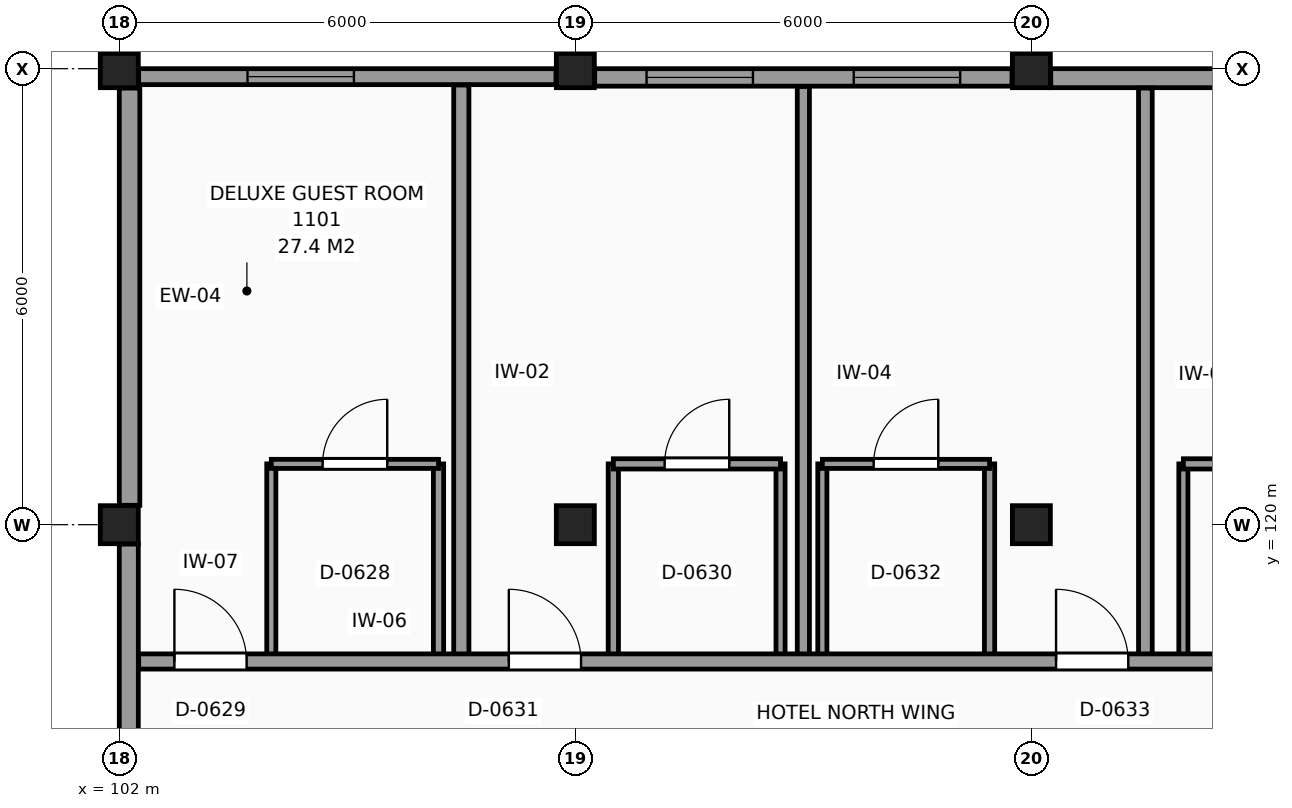
"""IFC4 building model, lengths in metres.
Left out: names, types, materials, properties, quantities, classifications, styles, units other than length and angle.
Written with IfcOpenShell. Run it as: python <this file> out.ifc"""

import sys

from ifc_helpers import new_model, si_unit, direction, frame, frame_2d, origin, origin_2d, place, context, subcontext, project, spatial, rectangle, extrude, element, fill, save


model = new_model("IFC4")
c1 = context("Model", 3, precision=1e-05, world=origin(), true_north=direction((0.0, 1.0)))
c2 = subcontext(c1, "Body", "Model", "MODEL_VIEW")
j1 = project(units=[si_unit("LENGTHUNIT", "METRE"), si_unit("PLANEANGLEUNIT", "RADIAN")], contexts=[c1])
p1 = place(None, origin())
s1 = spatial("IfcSite", under=j1, at=p1, CompositionType="ELEMENT")
p2 = place(p1, origin())
s2 = spatial("IfcBuilding", under=s1, at=p2, CompositionType="ELEMENT")
p3 = place(p2, frame((0.0, 0.0, 44.7)))
s3 = spatial("IfcBuildingStorey", under=s2, at=p3, CompositionType="ELEMENT", Elevation=44.7)
for number, where, z_axis, x_axis in (
    (1, (102.0, 120.0, 0.0), (0.0, 0.0, 1.0), (1.0, 0.0, 0.0)),
    (2, (102.0, 126.0, 0.0), (0.0, 0.0, 1.0), (1.0, 0.0, 0.0)),
    (3, (108.0, 120.0, 0.0), (0.0, 0.0, 1.0), (1.0, 0.0, 0.0)),
    (4, (108.0, 126.0, 0.0), (0.0, 0.0, 1.0), (1.0, 0.0, 0.0)),
    (5, (114.0, 120.0, 0.0), (0.0, 0.0, 1.0), (1.0, 0.0, 0.0)),
    (6, (114.0, 126.0, 0.0), (0.0, 0.0, 1.0), (1.0, 0.0, 0.0)),
):
    element("IfcColumn", number, at=place(p3, frame(where, z_axis=z_axis, x_axis=x_axis)), inside=s3, PredefinedType="COLUMN", context=c2, shape_type="SweptSolid", body=[
        extrude(rectangle(XDim=0.5, YDim=0.5, at=origin_2d()), origin(), (0.0, 0.0, 1.0), 3.3),
    ])
p4 = place(p3, frame((119.745, 125.875, 0.0), z_axis=(0.0, 0.0, 1.0), x_axis=(-1.0, 0.0, 0.0)))
e7 = element("IfcWall", 7, at=p4, inside=s3, PredefinedType="SOLIDWALL", context=c2, shape_type="SweptSolid", body=[
    extrude(rectangle(XDim=5.49, YDim=0.25, at=frame_2d((2.745, 0.0))), origin(), (0.0, 0.0, 1.0), 2.4),
])
p5 = place(p4, frame((1.432, 0.0, 0.8)))
e8 = element("IfcOpeningElement", 8, at=p5, cuts=e7, PredefinedType="OPENING", context=c2, shape_type="SweptSolid", body=[
    extrude(rectangle(XDim=1.4, YDim=1.4, at=frame_2d((0.7, 0.7))), frame((0.0, 0.135, 0.0), z_axis=(0.0, -1.0, 0.0), x_axis=(1.0, 0.0, 0.0)), (0.0, 0.0, 1.0), 0.27),
])
p6 = place(p3, frame((113.745, 125.885, 0.0), z_axis=(0.0, 0.0, 1.0), x_axis=(-1.0, 0.0, 0.0)))
e9 = element("IfcWall", 9, at=p6, inside=s3, PredefinedType="SOLIDWALL", context=c2, shape_type="SweptSolid", body=[
    extrude(rectangle(XDim=5.49, YDim=0.23, at=frame_2d((2.745, 0.0))), origin(), (0.0, 0.0, 1.0), 2.4),
])
p7 = place(p6, frame((3.408, 0.0, 0.8)))
e10 = element("IfcOpeningElement", 10, at=p7, cuts=e9, PredefinedType="OPENING", context=c2, shape_type="SweptSolid", body=[
    extrude(rectangle(XDim=1.4, YDim=1.4, at=frame_2d((0.7, 0.7))), frame((0.0, 0.125, 0.0), z_axis=(0.0, -1.0, 0.0), x_axis=(1.0, 0.0, 0.0)), (0.0, 0.0, 1.0), 0.25),
])
p8 = place(p6, frame((0.682, 0.0, 0.8)))
e11 = element("IfcOpeningElement", 11, at=p8, cuts=e9, PredefinedType="OPENING", context=c2, shape_type="SweptSolid", body=[
    extrude(rectangle(XDim=1.4, YDim=1.4, at=frame_2d((0.7, 0.7))), frame((0.0, 0.125, 0.0), z_axis=(0.0, -1.0, 0.0), x_axis=(1.0, 0.0, 0.0)), (0.0, 0.0, 1.0), 0.25),
])
p9 = place(p3, frame((107.745, 125.895, 0.0), z_axis=(0.0, 0.0, 1.0), x_axis=(-1.0, 0.0, 0.0)))
e12 = element("IfcWall", 12, at=p9, inside=s3, PredefinedType="SOLIDWALL", context=c2, shape_type="SweptSolid", body=[
    extrude(rectangle(XDim=5.49, YDim=0.21, at=frame_2d((2.745, 0.0))), origin(), (0.0, 0.0, 1.0), 2.4),
])
p10 = place(p9, frame((2.658, 0.0, 0.8)))
e13 = element("IfcOpeningElement", 13, at=p10, cuts=e12, PredefinedType="OPENING", context=c2, shape_type="SweptSolid", body=[
    extrude(rectangle(XDim=1.4, YDim=1.4, at=frame_2d((0.7, 0.7))), frame((0.0, 0.115, 0.0), z_axis=(0.0, -1.0, 0.0), x_axis=(1.0, 0.0, 0.0)), (0.0, 0.0, 1.0), 0.23),
])
p11 = place(p3, frame((102.135, 125.745, 0.0), z_axis=(0.0, 0.0, 1.0), x_axis=(0.0, -1.0, 0.0)))
e14 = element("IfcWall", 14, at=p11, inside=s3, PredefinedType="SOLIDWALL", context=c2, shape_type="SweptSolid", body=[
    extrude(rectangle(XDim=5.49, YDim=0.27, at=frame_2d((2.745, 0.0))), origin(), (0.0, 0.0, 1.0), 2.25),
])
p12 = place(p3, frame((102.125, 119.745, 0.0), z_axis=(0.0, 0.0, 1.0), x_axis=(0.0, -1.0, 0.0)))
e15 = element("IfcWall", 15, at=p12, inside=s3, PredefinedType="SOLIDWALL", context=c2, shape_type="SweptSolid", body=[
    extrude(rectangle(XDim=5.49, YDim=0.25, at=frame_2d((2.745, 0.0))), origin(), (0.0, 0.0, 1.0), 2.25),
])
p13 = place(p3, frame((104.0, 118.2, 0.0), z_axis=(0.0, 0.0, 1.0), x_axis=(0.0, 1.0, 0.0)))
e16 = element("IfcWall", 16, at=p13, inside=s3, PredefinedType="PARTITIONING", context=c2, shape_type="SweptSolid", body=[
    extrude(rectangle(XDim=2.6, YDim=0.12, at=frame_2d((1.3, 0.0))), origin(), (0.0, 0.0, 1.0), 3.05),
])
p14 = place(p3, frame((106.2, 118.2, 0.0), z_axis=(0.0, 0.0, 1.0), x_axis=(0.0, 1.0, 0.0)))
e17 = element("IfcWall", 17, at=p14, inside=s3, PredefinedType="PARTITIONING", context=c2, shape_type="SweptSolid", body=[
    extrude(rectangle(XDim=2.6, YDim=0.135, at=frame_2d((1.3, 0.0))), origin(), (0.0, 0.0, 1.0), 3.05),
])
p15 = place(p3, frame((106.5, 118.2, 0.0), z_axis=(0.0, 0.0, 1.0), x_axis=(0.0, 1.0, 0.0)))
e18 = element("IfcWall", 18, at=p15, inside=s3, PredefinedType="PARTITIONING", context=c2, shape_type="SweptSolid", body=[
    extrude(rectangle(XDim=7.585, YDim=0.2, at=frame_2d((3.792, 0.0))), origin(), (0.0, 0.0, 1.0), 3.05),
])
p16 = place(p3, frame((108.5, 118.2, 0.0), z_axis=(0.0, 0.0, 1.0), x_axis=(0.0, 1.0, 0.0)))
e19 = element("IfcWall", 19, at=p16, inside=s3, PredefinedType="PARTITIONING", context=c2, shape_type="SweptSolid", body=[
    extrude(rectangle(XDim=2.6, YDim=0.135, at=frame_2d((1.3, 0.0))), origin(), (0.0, 0.0, 1.0), 3.05),
])
p17 = place(p3, frame((110.7, 118.2, 0.0), z_axis=(0.0, 0.0, 1.0), x_axis=(0.0, 1.0, 0.0)))
e20 = element("IfcWall", 20, at=p17, inside=s3, PredefinedType="PARTITIONING", context=c2, shape_type="SweptSolid", body=[
    extrude(rectangle(XDim=2.6, YDim=0.12, at=frame_2d((1.3, 0.0))), origin(), (0.0, 0.0, 1.0), 3.05),
])
p18 = place(p3, frame((111.0, 118.2, 0.0), z_axis=(0.0, 0.0, 1.0), x_axis=(0.0, 1.0, 0.0)))
e21 = element("IfcWall", 21, at=p18, inside=s3, PredefinedType="PARTITIONING", context=c2, shape_type="SweptSolid", body=[
    extrude(rectangle(XDim=7.565, YDim=0.16, at=frame_2d((3.782, 0.0))), origin(), (0.0, 0.0, 1.0), 3.05),
])
p19 = place(p3, frame((111.25, 118.2, 0.0), z_axis=(0.0, 0.0, 1.0), x_axis=(0.0, 1.0, 0.0)))
e22 = element("IfcWall", 22, at=p19, inside=s3, PredefinedType="PARTITIONING", context=c2, shape_type="SweptSolid", body=[
    extrude(rectangle(XDim=2.6, YDim=0.12, at=frame_2d((1.3, 0.0))), origin(), (0.0, 0.0, 1.0), 3.05),
])
p20 = place(p3, frame((113.45, 118.2, 0.0), z_axis=(0.0, 0.0, 1.0), x_axis=(0.0, 1.0, 0.0)))
e23 = element("IfcWall", 23, at=p20, inside=s3, PredefinedType="PARTITIONING", context=c2, shape_type="SweptSolid", body=[
    extrude(rectangle(XDim=2.6, YDim=0.135, at=frame_2d((1.3, 0.0))), origin(), (0.0, 0.0, 1.0), 3.05),
])
p21 = place(p3, frame((115.5, 118.2, 0.0), z_axis=(0.0, 0.0, 1.0), x_axis=(0.0, 1.0, 0.0)))
e24 = element("IfcWall", 24, at=p21, inside=s3, PredefinedType="PARTITIONING", context=c2, shape_type="SweptSolid", body=[
    extrude(rectangle(XDim=7.545, YDim=0.18, at=frame_2d((3.772, 0.0))), origin(), (0.0, 0.0, 1.0), 3.05),
])
p22 = place(p3, frame((116.0, 118.2, 0.0), z_axis=(0.0, 0.0, 1.0), x_axis=(0.0, 1.0, 0.0)))
e25 = element("IfcWall", 25, at=p22, inside=s3, PredefinedType="PARTITIONING", context=c2, shape_type="SweptSolid", body=[
    extrude(rectangle(XDim=2.6, YDim=0.12, at=frame_2d((1.3, 0.0))), origin(), (0.0, 0.0, 1.0), 3.05),
])
p23 = place(p3, frame((102.255, 118.2, 0.0), z_axis=(0.0, 0.0, 1.0), x_axis=(1.0, 0.0, 0.0)))
e26 = element("IfcWall", 26, at=p23, inside=s3, PredefinedType="PARTITIONING", context=c2, shape_type="SweptSolid", body=[
    extrude(rectangle(XDim=74.245, YDim=0.2, at=frame_2d((37.123, 0.0))), origin(), (0.0, 0.0, 1.0), 3.05),
])
p24 = place(p23, frame((0.47, 0.0, 0.0)))
e27 = element("IfcOpeningElement", 27, at=p24, cuts=e26, PredefinedType="OPENING", context=c2, shape_type="SweptSolid", body=[
    extrude(rectangle(XDim=0.95, YDim=2.1, at=frame_2d((0.475, 1.05))), frame((0.0, 0.11, 0.0), z_axis=(0.0, -1.0, 0.0), x_axis=(1.0, 0.0, 0.0)), (0.0, 0.0, 1.0), 0.22),
])
p25 = place(p23, frame((4.87, 0.0, 0.0)))
e28 = element("IfcOpeningElement", 28, at=p25, cuts=e26, PredefinedType="OPENING", context=c2, shape_type="SweptSolid", body=[
    extrude(rectangle(XDim=0.95, YDim=2.1, at=frame_2d((0.475, 1.05))), frame((0.0, 0.11, 0.0), z_axis=(0.0, -1.0, 0.0), x_axis=(1.0, 0.0, 0.0)), (0.0, 0.0, 1.0), 0.22),
])
p26 = place(p23, frame((12.07, 0.0, 0.0)))
e29 = element("IfcOpeningElement", 29, at=p26, cuts=e26, PredefinedType="OPENING", context=c2, shape_type="SweptSolid", body=[
    extrude(rectangle(XDim=0.95, YDim=2.1, at=frame_2d((0.475, 1.05))), frame((0.0, 0.11, 0.0), z_axis=(0.0, -1.0, 0.0), x_axis=(1.0, 0.0, 0.0)), (0.0, 0.0, 1.0), 0.22),
])
p27 = place(p23, frame((16.27, 0.0, 0.0)))
e30 = element("IfcOpeningElement", 30, at=p27, cuts=e26, PredefinedType="OPENING", context=c2, shape_type="SweptSolid", body=[
    extrude(rectangle(XDim=0.95, YDim=2.1, at=frame_2d((0.475, 1.05))), frame((0.0, 0.11, 0.0), z_axis=(0.0, -1.0, 0.0), x_axis=(1.0, 0.0, 0.0)), (0.0, 0.0, 1.0), 0.22),
])
p28 = place(p23, frame((25.57, 0.0, 0.0)))
e31 = element("IfcOpeningElement", 31, at=p28, cuts=e26, PredefinedType="OPENING", context=c2, shape_type="SweptSolid", body=[
    extrude(rectangle(XDim=0.95, YDim=2.1, at=frame_2d((0.475, 1.05))), frame((0.0, 0.11, 0.0), z_axis=(0.0, -1.0, 0.0), x_axis=(1.0, 0.0, 0.0)), (0.0, 0.0, 1.0), 0.22),
])
p29 = place(p23, frame((30.07, 0.0, 0.0)))
e32 = element("IfcOpeningElement", 32, at=p29, cuts=e26, PredefinedType="OPENING", context=c2, shape_type="SweptSolid", body=[
    extrude(rectangle(XDim=0.95, YDim=2.1, at=frame_2d((0.475, 1.05))), frame((0.0, 0.11, 0.0), z_axis=(0.0, -1.0, 0.0), x_axis=(1.0, 0.0, 0.0)), (0.0, 0.0, 1.0), 0.22),
])
p30 = place(p23, frame((38.32, 0.0, 0.0)))
e33 = element("IfcOpeningElement", 33, at=p30, cuts=e26, PredefinedType="OPENING", context=c2, shape_type="SweptSolid", body=[
    extrude(rectangle(XDim=0.95, YDim=2.1, at=frame_2d((0.475, 1.05))), frame((0.0, 0.11, 0.0), z_axis=(0.0, -1.0, 0.0), x_axis=(1.0, 0.0, 0.0)), (0.0, 0.0, 1.0), 0.22),
])
p31 = place(p23, frame((46.27, 0.0, 0.0)))
e34 = element("IfcOpeningElement", 34, at=p31, cuts=e26, PredefinedType="OPENING", context=c2, shape_type="SweptSolid", body=[
    extrude(rectangle(XDim=0.95, YDim=2.1, at=frame_2d((0.475, 1.05))), frame((0.0, 0.11, 0.0), z_axis=(0.0, -1.0, 0.0), x_axis=(1.0, 0.0, 0.0)), (0.0, 0.0, 1.0), 0.22),
])
p32 = place(p23, frame((48.47, 0.0, 0.0)))
e35 = element("IfcOpeningElement", 35, at=p32, cuts=e26, PredefinedType="OPENING", context=c2, shape_type="SweptSolid", body=[
    extrude(rectangle(XDim=0.95, YDim=2.1, at=frame_2d((0.475, 1.05))), frame((0.0, 0.11, 0.0), z_axis=(0.0, -1.0, 0.0), x_axis=(1.0, 0.0, 0.0)), (0.0, 0.0, 1.0), 0.22),
])
p33 = place(p23, frame((54.47, 0.0, 0.0)))
e36 = element("IfcOpeningElement", 36, at=p33, cuts=e26, PredefinedType="OPENING", context=c2, shape_type="SweptSolid", body=[
    extrude(rectangle(XDim=0.95, YDim=2.1, at=frame_2d((0.475, 1.05))), frame((0.0, 0.11, 0.0), z_axis=(0.0, -1.0, 0.0), x_axis=(1.0, 0.0, 0.0)), (0.0, 0.0, 1.0), 0.22),
])
p34 = place(p23, frame((64.27, 0.0, 0.0)))
e37 = element("IfcOpeningElement", 37, at=p34, cuts=e26, PredefinedType="OPENING", context=c2, shape_type="SweptSolid", body=[
    extrude(rectangle(XDim=0.95, YDim=2.1, at=frame_2d((0.475, 1.05))), frame((0.0, 0.11, 0.0), z_axis=(0.0, -1.0, 0.0), x_axis=(1.0, 0.0, 0.0)), (0.0, 0.0, 1.0), 0.22),
])
p35 = place(p23, frame((68.22, 0.0, 0.0)))
e38 = element("IfcOpeningElement", 38, at=p35, cuts=e26, PredefinedType="OPENING", context=c2, shape_type="SweptSolid", body=[
    extrude(rectangle(XDim=0.95, YDim=2.1, at=frame_2d((0.475, 1.05))), frame((0.0, 0.11, 0.0), z_axis=(0.0, -1.0, 0.0), x_axis=(1.0, 0.0, 0.0)), (0.0, 0.0, 1.0), 0.22),
])
p36 = place(p3, frame((104.0, 120.8, 0.0), z_axis=(0.0, 0.0, 1.0), x_axis=(1.0, 0.0, 0.0)))
e39 = element("IfcWall", 39, at=p36, inside=s3, PredefinedType="PARTITIONING", context=c2, shape_type="SweptSolid", body=[
    extrude(rectangle(XDim=2.2, YDim=0.12, at=frame_2d((1.1, 0.0))), origin(), (0.0, 0.0, 1.0), 3.05),
])
p37 = place(p36, frame((0.675, 0.0, 0.0)))
e40 = element("IfcOpeningElement", 40, at=p37, cuts=e39, PredefinedType="OPENING", context=c2, shape_type="SweptSolid", body=[
    extrude(rectangle(XDim=0.85, YDim=2.1, at=frame_2d((0.425, 1.05))), frame((0.0, 0.07, 0.0), z_axis=(0.0, -1.0, 0.0), x_axis=(1.0, 0.0, 0.0)), (0.0, 0.0, 1.0), 0.14),
])
p38 = place(p3, frame((108.5, 120.8, 0.0), z_axis=(0.0, 0.0, 1.0), x_axis=(1.0, 0.0, 0.0)))
e41 = element("IfcWall", 41, at=p38, inside=s3, PredefinedType="PARTITIONING", context=c2, shape_type="SweptSolid", body=[
    extrude(rectangle(XDim=2.2, YDim=0.135, at=frame_2d((1.1, 0.0))), origin(), (0.0, 0.0, 1.0), 3.05),
])
p39 = place(p38, frame((0.675, 0.0, 0.0)))
e42 = element("IfcOpeningElement", 42, at=p39, cuts=e41, PredefinedType="OPENING", context=c2, shape_type="SweptSolid", body=[
    extrude(rectangle(XDim=0.85, YDim=2.1, at=frame_2d((0.425, 1.05))), frame((0.0, 0.078, 0.0), z_axis=(0.0, -1.0, 0.0), x_axis=(1.0, 0.0, 0.0)), (0.0, 0.0, 1.0), 0.155),
])
p40 = place(p3, frame((111.25, 120.8, 0.0), z_axis=(0.0, 0.0, 1.0), x_axis=(1.0, 0.0, 0.0)))
e43 = element("IfcWall", 43, at=p40, inside=s3, PredefinedType="PARTITIONING", context=c2, shape_type="SweptSolid", body=[
    extrude(rectangle(XDim=2.2, YDim=0.12, at=frame_2d((1.1, 0.0))), origin(), (0.0, 0.0, 1.0), 3.05),
])
p41 = place(p40, frame((0.675, 0.0, 0.0)))
e44 = element("IfcOpeningElement", 44, at=p41, cuts=e43, PredefinedType="OPENING", context=c2, shape_type="SweptSolid", body=[
    extrude(rectangle(XDim=0.85, YDim=2.1, at=frame_2d((0.425, 1.05))), frame((0.0, 0.07, 0.0), z_axis=(0.0, -1.0, 0.0), x_axis=(1.0, 0.0, 0.0)), (0.0, 0.0, 1.0), 0.14),
])
p42 = place(p3, frame((116.0, 120.8, 0.0), z_axis=(0.0, 0.0, 1.0), x_axis=(1.0, 0.0, 0.0)))
e45 = element("IfcWall", 45, at=p42, inside=s3, PredefinedType="PARTITIONING", context=c2, shape_type="SweptSolid", body=[
    extrude(rectangle(XDim=2.2, YDim=0.135, at=frame_2d((1.1, 0.0))), origin(), (0.0, 0.0, 1.0), 3.05),
])
p43 = place(p42, frame((0.675, 0.0, 0.0)))
e46 = element("IfcOpeningElement", 46, at=p43, cuts=e45, PredefinedType="OPENING", context=c2, shape_type="SweptSolid", body=[
    extrude(rectangle(XDim=0.85, YDim=2.1, at=frame_2d((0.425, 1.05))), frame((0.0, 0.078, 0.0), z_axis=(0.0, -1.0, 0.0), x_axis=(1.0, 0.0, 0.0)), (0.0, 0.0, 1.0), 0.155),
])
p44 = place(p10, origin())
e47 = element("IfcWindow", 47, at=p44, inside=s3, PartitioningType="SINGLE_PANEL", PredefinedType="WINDOW", context=c2, shape_type="SweptSolid", body=[
    extrude(rectangle(XDim=1.4, YDim=1.4, at=frame_2d((0.7, 0.7))), frame((0.0, 0.03, 0.0), z_axis=(0.0, -1.0, 0.0), x_axis=(1.0, 0.0, 0.0)), (0.0, 0.0, 1.0), 0.06),
])
fill(e13, e47)
p45 = place(p7, origin())
e48 = element("IfcWindow", 48, at=p45, inside=s3, PartitioningType="SINGLE_PANEL", PredefinedType="WINDOW", context=c2, shape_type="SweptSolid", body=[
    extrude(rectangle(XDim=1.4, YDim=1.4, at=frame_2d((0.7, 0.7))), frame((0.0, 0.03, 0.0), z_axis=(0.0, -1.0, 0.0), x_axis=(1.0, 0.0, 0.0)), (0.0, 0.0, 1.0), 0.06),
])
fill(e10, e48)
p46 = place(p8, origin())
e49 = element("IfcWindow", 49, at=p46, inside=s3, PartitioningType="SINGLE_PANEL", PredefinedType="WINDOW", context=c2, shape_type="SweptSolid", body=[
    extrude(rectangle(XDim=1.4, YDim=1.4, at=frame_2d((0.7, 0.7))), frame((0.0, 0.03, 0.0), z_axis=(0.0, -1.0, 0.0), x_axis=(1.0, 0.0, 0.0)), (0.0, 0.0, 1.0), 0.06),
])
fill(e11, e49)
p47 = place(p37, origin())
e50 = element("IfcDoor", 50, at=p47, inside=s3, OperationType="SINGLE_SWING_RIGHT", PredefinedType="DOOR", context=c2, shape_type="SweptSolid", body=[
    extrude(rectangle(XDim=0.85, YDim=2.1, at=frame_2d((0.425, 1.05))), frame((0.0, 0.025, 0.0), z_axis=(0.0, -1.0, 0.0), x_axis=(1.0, 0.0, 0.0)), (0.0, 0.0, 1.0), 0.05),
])
fill(e40, e50)
p48 = place(p24, origin())
e51 = element("IfcDoor", 51, at=p48, inside=s3, OperationType="SINGLE_SWING_LEFT", PredefinedType="DOOR", context=c2, shape_type="SweptSolid", body=[
    extrude(rectangle(XDim=0.95, YDim=2.1, at=frame_2d((0.475, 1.05))), frame((0.0, 0.025, 0.0), z_axis=(0.0, -1.0, 0.0), x_axis=(1.0, 0.0, 0.0)), (0.0, 0.0, 1.0), 0.05),
])
fill(e27, e51)
p49 = place(p39, origin())
e52 = element("IfcDoor", 52, at=p49, inside=s3, OperationType="SINGLE_SWING_RIGHT", PredefinedType="DOOR", context=c2, shape_type="SweptSolid", body=[
    extrude(rectangle(XDim=0.85, YDim=2.1, at=frame_2d((0.425, 1.05))), frame((0.0, 0.025, 0.0), z_axis=(0.0, -1.0, 0.0), x_axis=(1.0, 0.0, 0.0)), (0.0, 0.0, 1.0), 0.05),
])
fill(e42, e52)
p50 = place(p25, origin())
e53 = element("IfcDoor", 53, at=p50, inside=s3, OperationType="SINGLE_SWING_LEFT", PredefinedType="DOOR", context=c2, shape_type="SweptSolid", body=[
    extrude(rectangle(XDim=0.95, YDim=2.1, at=frame_2d((0.475, 1.05))), frame((0.0, 0.025, 0.0), z_axis=(0.0, -1.0, 0.0), x_axis=(1.0, 0.0, 0.0)), (0.0, 0.0, 1.0), 0.05),
])
fill(e28, e53)
p51 = place(p41, origin())
e54 = element("IfcDoor", 54, at=p51, inside=s3, OperationType="SINGLE_SWING_RIGHT", PredefinedType="DOOR", context=c2, shape_type="SweptSolid", body=[
    extrude(rectangle(XDim=0.85, YDim=2.1, at=frame_2d((0.425, 1.05))), frame((0.0, 0.025, 0.0), z_axis=(0.0, -1.0, 0.0), x_axis=(1.0, 0.0, 0.0)), (0.0, 0.0, 1.0), 0.05),
])
fill(e44, e54)
p52 = place(p26, origin())
e55 = element("IfcDoor", 55, at=p52, inside=s3, OperationType="SINGLE_SWING_LEFT", PredefinedType="DOOR", context=c2, shape_type="SweptSolid", body=[
    extrude(rectangle(XDim=0.95, YDim=2.1, at=frame_2d((0.475, 1.05))), frame((0.0, 0.025, 0.0), z_axis=(0.0, -1.0, 0.0), x_axis=(1.0, 0.0, 0.0)), (0.0, 0.0, 1.0), 0.05),
])
fill(e29, e55)
save(model, sys.argv[1])
